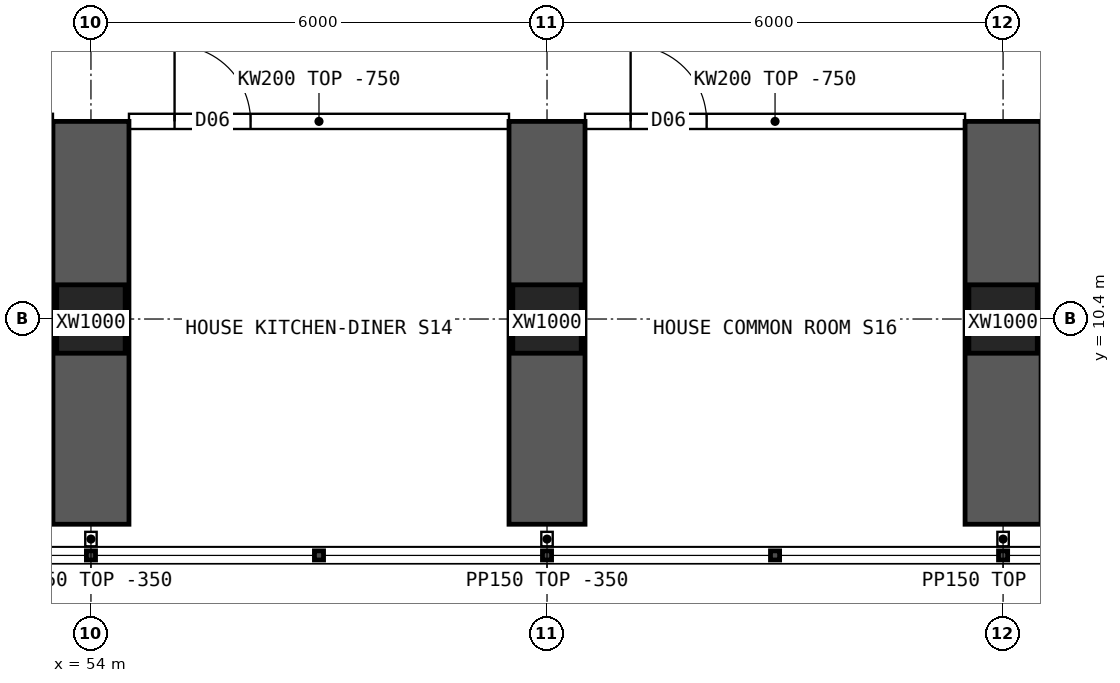
"""IFC4 building model, lengths in metres.
Left out: names, types, materials, properties, quantities, classifications, styles, units other than length and angle.
Written with IfcOpenShell. Run it as: python <this file> out.ifc"""

import sys

from ifc_helpers import new_model, si_unit, direction, frame, frame_2d, origin, origin_2d, place, context, subcontext, project, spatial, polyline, rectangle, hollow_rectangle, outline, extrude, element, fill, save


model = new_model("IFC4")
c1 = context("Model", 3, precision=1e-05, world=origin(), true_north=direction((0.0, 1.0)))
c2 = subcontext(c1, "Body", "Model", "MODEL_VIEW")
j1 = project(units=[si_unit("LENGTHUNIT", "METRE"), si_unit("PLANEANGLEUNIT", "RADIAN")], contexts=[c1])
p1 = place(None, origin())
s1 = spatial("IfcSite", under=j1, at=p1, CompositionType="ELEMENT")
p2 = place(p1, origin())
s2 = spatial("IfcBuilding", under=s1, at=p2, CompositionType="ELEMENT")
p3 = place(p2, frame((0.0, 0.0, 65.2)))
s3 = spatial("IfcBuildingStorey", under=s2, at=p3, CompositionType="ELEMENT", Elevation=65.2)
for number, where, z_axis, x_axis in (
    (1, (54.0, 10.4, 0.0), (0.0, 0.0, 1.0), (1.0, 0.0, 0.0)),
    (2, (60.0, 10.4, 0.0), (0.0, 0.0, 1.0), (1.0, 0.0, 0.0)),
    (3, (66.0, 10.4, 0.0), (0.0, 0.0, 1.0), (1.0, 0.0, 0.0)),
):
    element("IfcColumn", number, at=place(p3, frame(where, z_axis=z_axis, x_axis=x_axis)), inside=s3, PredefinedType="COLUMN", context=c2, shape_type="SweptSolid", body=[
        extrude(hollow_rectangle(XDim=0.9, YDim=0.9, WallThickness=0.09, at=origin_2d()), origin(), (0.0, 0.0, 1.0), 3.75),
    ])
for number, where, z_axis, x_axis in (
    (4, (54.0, 7.7, 0.0), (0.0, 0.0, 1.0), (0.0, 1.0, 0.0)),
    (5, (60.0, 7.7, 0.0), (0.0, 0.0, 1.0), (0.0, 1.0, 0.0)),
    (6, (66.0, 7.7, 0.0), (0.0, 0.0, 1.0), (0.0, 1.0, 0.0)),
):
    element("IfcWall", number, at=place(p3, frame(where, z_axis=z_axis, x_axis=x_axis)), inside=s3, PredefinedType="SHEAR", context=c2, shape_type="SweptSolid", body=[
        extrude(rectangle(XDim=5.3, YDim=1.0, at=frame_2d((2.65, 0.0))), origin(), (0.0, 0.0, 1.0), 3.75),
    ])
p4 = place(p3, frame((54.5, 13.0, 0.0), z_axis=(0.0, 0.0, 1.0), x_axis=(1.0, 0.0, 0.0)))
e7 = element("IfcWall", 7, at=p4, inside=s3, PredefinedType="SOLIDWALL", context=c2, shape_type="SweptSolid", body=[
    extrude(outline(polyline([(0.0, 0.0), (5.0, 0.0), (5.0, 3.0), (0.0, 3.0), (0.0, 0.0)])), frame((0.0, 0.1, 0.0), z_axis=(0.0, -1.0, 0.0), x_axis=(1.0, 0.0, 0.0)), (0.0, 0.0, 1.0), 0.2),
])
p5 = place(p4, frame((0.6, 0.0, 0.0)))
e8 = element("IfcOpeningElement", 8, at=p5, cuts=e7, PredefinedType="OPENING", context=c2, shape_type="SweptSolid", body=[
    extrude(rectangle(XDim=1.0, YDim=2.1, at=frame_2d((0.5, 1.05))), frame((0.0, 0.11, 0.0), z_axis=(0.0, -1.0, 0.0), x_axis=(1.0, 0.0, 0.0)), (0.0, 0.0, 1.0), 0.22),
])
p6 = place(p3, frame((60.5, 13.0, 0.0), z_axis=(0.0, 0.0, 1.0), x_axis=(1.0, 0.0, 0.0)))
e9 = element("IfcWall", 9, at=p6, inside=s3, PredefinedType="SOLIDWALL", context=c2, shape_type="SweptSolid", body=[
    extrude(outline(polyline([(0.0, 0.0), (5.0, 0.0), (5.0, 3.0), (0.0, 3.0), (0.0, 0.0)])), frame((0.0, 0.1, 0.0), z_axis=(0.0, -1.0, 0.0), x_axis=(1.0, 0.0, 0.0)), (0.0, 0.0, 1.0), 0.2),
])
p7 = place(p6, frame((0.6, 0.0, 0.0)))
e10 = element("IfcOpeningElement", 10, at=p7, cuts=e9, PredefinedType="OPENING", context=c2, shape_type="SweptSolid", body=[
    extrude(rectangle(XDim=1.0, YDim=2.1, at=frame_2d((0.5, 1.05))), frame((0.0, 0.11, 0.0), z_axis=(0.0, -1.0, 0.0), x_axis=(1.0, 0.0, 0.0)), (0.0, 0.0, 1.0), 0.22),
])
p8 = place(p3, frame((67.75, 10.358, 0.0), z_axis=(0.0, 0.0, 1.0), x_axis=(-1.0, 0.0, 0.0)))
e11 = element("IfcWall", 11, at=p8, inside=s3, PredefinedType="PARTITIONING", context=c2, shape_type="SweptSolid", body=[
    extrude(outline(polyline([(0.0, 0.0), (1.3, 0.0), (1.3, 3.0), (0.0, 3.0), (0.0, 0.0)])), frame((0.0, 0.05, 0.0), z_axis=(0.0, -1.0, 0.0), x_axis=(1.0, 0.0, 0.0)), (0.0, 0.0, 1.0), 0.1),
])
p9 = place(p8, frame((0.175, 0.0, 0.0)))
e12 = element("IfcOpeningElement", 12, at=p9, cuts=e11, PredefinedType="OPENING", context=c2, shape_type="SweptSolid", body=[
    extrude(rectangle(XDim=0.9, YDim=2.1, at=frame_2d((0.45, 1.05))), frame((0.0, 0.06, 0.0), z_axis=(0.0, -1.0, 0.0), x_axis=(1.0, 0.0, 0.0)), (0.0, 0.0, 1.0), 0.12),
])
for number, where, z_axis, x_axis in (
    (13, (54.0, 7.6, 0.0), (0.0, 0.0, 1.0), (0.0, -1.0, 0.0)),
    (14, (60.0, 7.6, 0.0), (0.0, 0.0, 1.0), (0.0, -1.0, 0.0)),
    (15, (66.0, 7.6, 0.0), (0.0, 0.0, 1.0), (0.0, -1.0, 0.0)),
):
    element("IfcWall", number, at=place(p3, frame(where, z_axis=z_axis, x_axis=x_axis)), inside=s3, PredefinedType="PARTITIONING", context=c2, shape_type="SweptSolid", body=[
        extrude(rectangle(XDim=0.19, YDim=0.15, at=frame_2d((0.095, 0.0))), origin(), (0.0, 0.0, 1.0), 3.4),
    ])
p10 = place(p5, origin())
e16 = element("IfcDoor", 16, at=p10, inside=s3, OperationType="SINGLE_SWING_LEFT", PredefinedType="DOOR", context=c2, shape_type="SweptSolid", body=[
    extrude(rectangle(XDim=1.0, YDim=2.1, at=frame_2d((0.5, 1.05))), frame((0.0, 0.025, 0.0), z_axis=(0.0, -1.0, 0.0), x_axis=(1.0, 0.0, 0.0)), (0.0, 0.0, 1.0), 0.05),
])
fill(e8, e16)
p11 = place(p7, origin())
e17 = element("IfcDoor", 17, at=p11, inside=s3, OperationType="SINGLE_SWING_LEFT", PredefinedType="DOOR", context=c2, shape_type="SweptSolid", body=[
    extrude(rectangle(XDim=1.0, YDim=2.1, at=frame_2d((0.5, 1.05))), frame((0.0, 0.025, 0.0), z_axis=(0.0, -1.0, 0.0), x_axis=(1.0, 0.0, 0.0)), (0.0, 0.0, 1.0), 0.05),
])
fill(e10, e17)
save(model, sys.argv[1])
